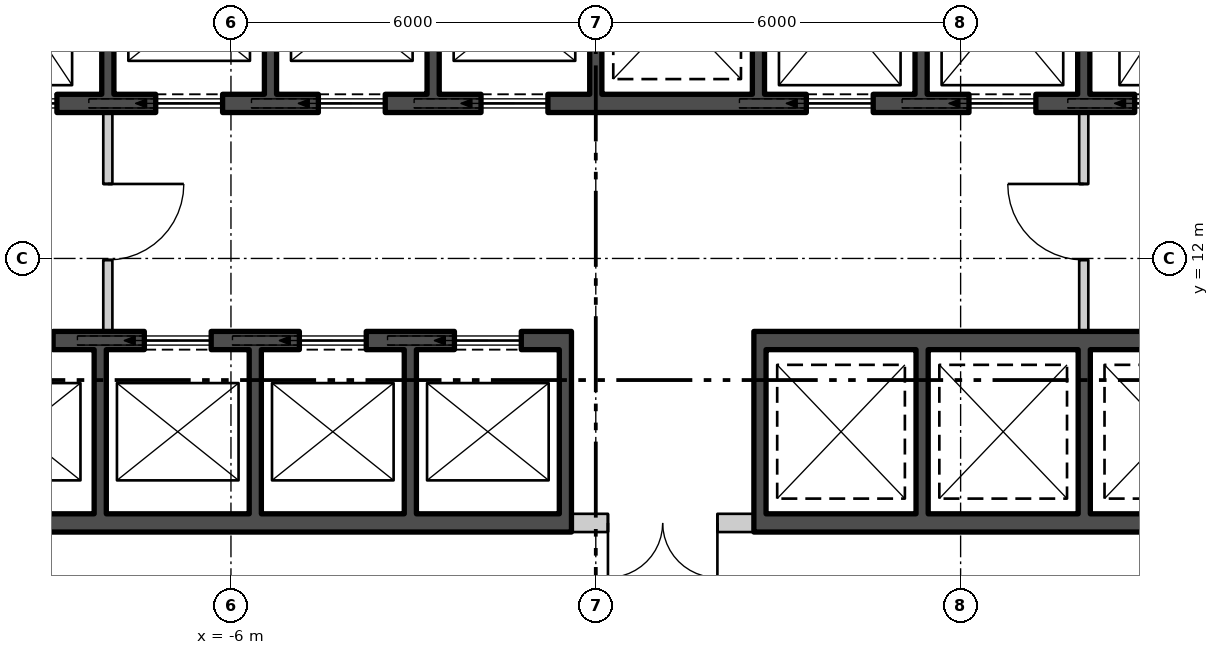
"""IFC4 building model, lengths in metres.
Left out: names, types, materials, properties, quantities, classifications, styles, units other than length and angle.
Written with IfcOpenShell. Run it as: python <this file> out.ifc"""

import sys

from ifc_helpers import new_model, si_unit, direction, frame, frame_2d, origin, place, context, subcontext, project, spatial, rectangle, extrude, element, fill, save


model = new_model("IFC4")
c1 = context("Model", 3, precision=1e-05, world=origin(), true_north=direction((0.0, 1.0)))
c2 = subcontext(c1, "Body", "Model", "MODEL_VIEW")
j1 = project(units=[si_unit("LENGTHUNIT", "METRE"), si_unit("PLANEANGLEUNIT", "RADIAN")], contexts=[c1])
p1 = place(None, origin())
s1 = spatial("IfcSite", under=j1, at=p1, CompositionType="ELEMENT")
p2 = place(p1, origin())
s2 = spatial("IfcBuilding", under=s1, at=p2, CompositionType="ELEMENT")
p3 = place(p2, frame((0.0, 0.0, 18.6)))
s3 = spatial("IfcBuildingStorey", under=s2, at=p3, CompositionType="ELEMENT", Elevation=18.6)
p4 = place(p3, frame((-10.7, 14.55, 0.0), z_axis=(0.0, 0.0, 1.0), x_axis=(1.0, 0.0, 0.0)))
e1 = element("IfcWall", 1, at=p4, inside=s3, PredefinedType="SHEAR", context=c2, shape_type="SweptSolid", body=[
    extrude(rectangle(XDim=21.4, YDim=0.3, at=frame_2d((10.7, 0.0))), origin(), (0.0, 0.0, 1.0), 4.88),
])
p5 = place(p4, frame((0.738, 0.0, 0.0)))
e2 = element("IfcOpeningElement", 2, at=p5, cuts=e1, PredefinedType="OPENING", context=c2, shape_type="SweptSolid", body=[
    extrude(rectangle(XDim=1.1, YDim=2.1, at=frame_2d((0.55, 1.05))), frame((0.0, 0.16, 0.0), z_axis=(0.0, -1.0, 0.0), x_axis=(1.0, 0.0, 0.0)), (0.0, 0.0, 1.0), 0.32),
])
p6 = place(p4, frame((3.462, 0.0, 0.0)))
e3 = element("IfcOpeningElement", 3, at=p6, cuts=e1, PredefinedType="OPENING", context=c2, shape_type="SweptSolid", body=[
    extrude(rectangle(XDim=1.1, YDim=2.1, at=frame_2d((0.55, 1.05))), frame((0.0, 0.16, 0.0), z_axis=(0.0, -1.0, 0.0), x_axis=(1.0, 0.0, 0.0)), (0.0, 0.0, 1.0), 0.32),
])
p7 = place(p4, frame((6.138, 0.0, 0.0)))
e4 = element("IfcOpeningElement", 4, at=p7, cuts=e1, PredefinedType="OPENING", context=c2, shape_type="SweptSolid", body=[
    extrude(rectangle(XDim=1.1, YDim=2.1, at=frame_2d((0.55, 1.05))), frame((0.0, 0.16, 0.0), z_axis=(0.0, -1.0, 0.0), x_axis=(1.0, 0.0, 0.0)), (0.0, 0.0, 1.0), 0.32),
])
p8 = place(p4, frame((8.812, 0.0, 0.0)))
e5 = element("IfcOpeningElement", 5, at=p8, cuts=e1, PredefinedType="OPENING", context=c2, shape_type="SweptSolid", body=[
    extrude(rectangle(XDim=1.1, YDim=2.1, at=frame_2d((0.55, 1.05))), frame((0.0, 0.16, 0.0), z_axis=(0.0, -1.0, 0.0), x_axis=(1.0, 0.0, 0.0)), (0.0, 0.0, 1.0), 0.32),
])
p9 = place(p4, frame((14.162, 0.0, 0.0)))
e6 = element("IfcOpeningElement", 6, at=p9, cuts=e1, PredefinedType="OPENING", context=c2, shape_type="SweptSolid", body=[
    extrude(rectangle(XDim=1.1, YDim=2.1, at=frame_2d((0.55, 1.05))), frame((0.0, 0.16, 0.0), z_axis=(0.0, -1.0, 0.0), x_axis=(1.0, 0.0, 0.0)), (0.0, 0.0, 1.0), 0.32),
])
p10 = place(p4, frame((16.837, 0.0, 0.0)))
e7 = element("IfcOpeningElement", 7, at=p10, cuts=e1, PredefinedType="OPENING", context=c2, shape_type="SweptSolid", body=[
    extrude(rectangle(XDim=1.1, YDim=2.1, at=frame_2d((0.55, 1.05))), frame((0.0, 0.16, 0.0), z_axis=(0.0, -1.0, 0.0), x_axis=(1.0, 0.0, 0.0)), (0.0, 0.0, 1.0), 0.32),
])
p11 = place(p4, frame((19.562, 0.0, 0.0)))
e8 = element("IfcOpeningElement", 8, at=p11, cuts=e1, PredefinedType="OPENING", context=c2, shape_type="SweptSolid", body=[
    extrude(rectangle(XDim=1.1, YDim=2.1, at=frame_2d((0.55, 1.05))), frame((0.0, 0.16, 0.0), z_axis=(0.0, -1.0, 0.0), x_axis=(1.0, 0.0, 0.0)), (0.0, 0.0, 1.0), 0.32),
])
p12 = place(p3, frame((-10.7, 10.65, 0.0), z_axis=(0.0, 0.0, 1.0), x_axis=(1.0, 0.0, 0.0)))
e9 = element("IfcWall", 9, at=p12, inside=s3, PredefinedType="SHEAR", context=c2, shape_type="SweptSolid", body=[
    extrude(rectangle(XDim=10.3, YDim=0.3, at=frame_2d((5.15, 0.0))), origin(), (0.0, 0.0, 1.0), 4.88),
])
p13 = place(p12, frame((0.675, 0.0, 0.0)))
e10 = element("IfcOpeningElement", 10, at=p13, cuts=e9, PredefinedType="OPENING", context=c2, shape_type="SweptSolid", body=[
    extrude(rectangle(XDim=1.1, YDim=2.1, at=frame_2d((0.55, 1.05))), frame((0.0, 0.16, 0.0), z_axis=(0.0, -1.0, 0.0), x_axis=(1.0, 0.0, 0.0)), (0.0, 0.0, 1.0), 0.32),
])
p14 = place(p12, frame((3.275, 0.0, 0.0)))
e11 = element("IfcOpeningElement", 11, at=p14, cuts=e9, PredefinedType="OPENING", context=c2, shape_type="SweptSolid", body=[
    extrude(rectangle(XDim=1.1, YDim=2.1, at=frame_2d((0.55, 1.05))), frame((0.0, 0.16, 0.0), z_axis=(0.0, -1.0, 0.0), x_axis=(1.0, 0.0, 0.0)), (0.0, 0.0, 1.0), 0.32),
])
p15 = place(p12, frame((5.825, 0.0, 0.0)))
e12 = element("IfcOpeningElement", 12, at=p15, cuts=e9, PredefinedType="OPENING", context=c2, shape_type="SweptSolid", body=[
    extrude(rectangle(XDim=1.1, YDim=2.1, at=frame_2d((0.55, 1.05))), frame((0.0, 0.16, 0.0), z_axis=(0.0, -1.0, 0.0), x_axis=(1.0, 0.0, 0.0)), (0.0, 0.0, 1.0), 0.32),
])
p16 = place(p12, frame((8.375, 0.0, 0.0)))
e13 = element("IfcOpeningElement", 13, at=p16, cuts=e9, PredefinedType="OPENING", context=c2, shape_type="SweptSolid", body=[
    extrude(rectangle(XDim=1.1, YDim=2.1, at=frame_2d((0.55, 1.05))), frame((0.0, 0.16, 0.0), z_axis=(0.0, -1.0, 0.0), x_axis=(1.0, 0.0, 0.0)), (0.0, 0.0, 1.0), 0.32),
])
p17 = place(p3, frame((-10.7, 7.65, 0.0), z_axis=(0.0, 0.0, 1.0), x_axis=(1.0, 0.0, 0.0)))
e14 = element("IfcWall", 14, at=p17, inside=s3, PredefinedType="SHEAR", context=c2, shape_type="SweptSolid", body=[
    extrude(rectangle(XDim=10.3, YDim=0.3, at=frame_2d((5.15, 0.0))), origin(), (0.0, 0.0, 1.0), 4.88),
])
for number, where, z_axis, x_axis in (
    (15, (2.6, 10.65, 0.0), (0.0, 0.0, 1.0), (1.0, 0.0, 0.0)),
    (16, (2.6, 7.65, 0.0), (0.0, 0.0, 1.0), (1.0, 0.0, 0.0)),
):
    element("IfcWall", number, at=place(p3, frame(where, z_axis=z_axis, x_axis=x_axis)), inside=s3, PredefinedType="SHEAR", context=c2, shape_type="SweptSolid", body=[
        extrude(rectangle(XDim=8.1, YDim=0.3, at=frame_2d((4.05, 0.0))), origin(), (0.0, 0.0, 1.0), 4.88),
    ])
for number, where, z_axis, x_axis in (
    (17, (-8.025, 14.7, 0.0), (0.0, 0.0, 1.0), (0.0, 1.0, 0.0)),
    (18, (-5.35, 14.7, 0.0), (0.0, 0.0, 1.0), (0.0, 1.0, 0.0)),
    (19, (-2.675, 14.7, 0.0), (0.0, 0.0, 1.0), (0.0, 1.0, 0.0)),
    (20, (0.0, 14.7, 0.0), (0.0, 0.0, 1.0), (0.0, 1.0, 0.0)),
    (21, (2.675, 14.7, 0.0), (0.0, 0.0, 1.0), (0.0, 1.0, 0.0)),
    (22, (5.35, 14.7, 0.0), (0.0, 0.0, 1.0), (0.0, 1.0, 0.0)),
    (23, (8.025, 14.7, 0.0), (0.0, 0.0, 1.0), (0.0, 1.0, 0.0)),
    (24, (-8.15, 7.8, 0.0), (0.0, 0.0, 1.0), (0.0, 1.0, 0.0)),
    (25, (-5.6, 7.8, 0.0), (0.0, 0.0, 1.0), (0.0, 1.0, 0.0)),
    (26, (-3.05, 7.8, 0.0), (0.0, 0.0, 1.0), (0.0, 1.0, 0.0)),
    (27, (-0.5, 7.8, 0.0), (0.0, 0.0, 1.0), (0.0, 1.0, 0.0)),
    (28, (2.7, 7.8, 0.0), (0.0, 0.0, 1.0), (0.0, 1.0, 0.0)),
    (29, (5.367, 7.8, 0.0), (0.0, 0.0, 1.0), (0.0, 1.0, 0.0)),
    (30, (8.033, 7.8, 0.0), (0.0, 0.0, 1.0), (0.0, 1.0, 0.0)),
):
    element("IfcWall", number, at=place(p3, frame(where, z_axis=z_axis, x_axis=x_axis)), inside=s3, PredefinedType="SHEAR", context=c2, shape_type="SweptSolid", body=[
        extrude(rectangle(XDim=2.7, YDim=0.2, at=frame_2d((1.35, 0.0))), origin(), (0.0, 0.0, 1.0), 4.88),
    ])
p18 = place(p3, frame((-8.025, 10.8, 0.0), z_axis=(0.0, 0.0, 1.0), x_axis=(0.0, 1.0, 0.0)))
e31 = element("IfcWall", 31, at=p18, inside=s3, PredefinedType="PARTITIONING", context=c2, shape_type="SweptSolid", body=[
    extrude(rectangle(XDim=3.6, YDim=0.15, at=frame_2d((1.8, 0.0))), origin(), (0.0, 0.0, 1.0), 4.88),
])
p19 = place(p18, frame((1.175, 0.0, 0.0)))
e32 = element("IfcOpeningElement", 32, at=p19, cuts=e31, PredefinedType="OPENING", context=c2, shape_type="SweptSolid", body=[
    extrude(rectangle(XDim=1.25, YDim=2.1, at=frame_2d((0.625, 1.05))), frame((0.0, 0.085, 0.0), z_axis=(0.0, -1.0, 0.0), x_axis=(1.0, 0.0, 0.0)), (0.0, 0.0, 1.0), 0.17),
])
p20 = place(p3, frame((8.025, 10.8, 0.0), z_axis=(0.0, 0.0, 1.0), x_axis=(0.0, 1.0, 0.0)))
e33 = element("IfcWall", 33, at=p20, inside=s3, PredefinedType="PARTITIONING", context=c2, shape_type="SweptSolid", body=[
    extrude(rectangle(XDim=3.6, YDim=0.15, at=frame_2d((1.8, 0.0))), origin(), (0.0, 0.0, 1.0), 4.88),
])
p21 = place(p20, frame((1.175, 0.0, 0.0)))
e34 = element("IfcOpeningElement", 34, at=p21, cuts=e33, PredefinedType="OPENING", context=c2, shape_type="SweptSolid", body=[
    extrude(rectangle(XDim=1.25, YDim=2.1, at=frame_2d((0.625, 1.05))), frame((0.0, 0.085, 0.0), z_axis=(0.0, -1.0, 0.0), x_axis=(1.0, 0.0, 0.0)), (0.0, 0.0, 1.0), 0.17),
])
p22 = place(p3, frame((-0.4, 7.65, 0.0), z_axis=(0.0, 0.0, 1.0), x_axis=(1.0, 0.0, 0.0)))
e35 = element("IfcWall", 35, at=p22, inside=s3, PredefinedType="PARTITIONING", context=c2, shape_type="SweptSolid", body=[
    extrude(rectangle(XDim=3.0, YDim=0.3, at=frame_2d((1.5, 0.0))), origin(), (0.0, 0.0, 1.0), 4.88),
])
p23 = place(p22, frame((0.6, 0.0, 0.0)))
e36 = element("IfcOpeningElement", 36, at=p23, cuts=e35, PredefinedType="OPENING", context=c2, shape_type="SweptSolid", body=[
    extrude(rectangle(XDim=1.8, YDim=2.4, at=frame_2d((0.9, 1.2))), frame((0.0, 0.16, 0.0), z_axis=(0.0, -1.0, 0.0), x_axis=(1.0, 0.0, 0.0)), (0.0, 0.0, 1.0), 0.32),
])
p24 = place(p5, origin())
e37 = element("IfcDoor", 37, at=p24, inside=s3, OperationType="SLIDING_TO_LEFT", PredefinedType="DOOR", context=c2, shape_type="SweptSolid", body=[
    extrude(rectangle(XDim=1.1, YDim=2.1, at=frame_2d((0.55, 1.05))), frame((0.0, 0.025, 0.0), z_axis=(0.0, -1.0, 0.0), x_axis=(1.0, 0.0, 0.0)), (0.0, 0.0, 1.0), 0.05),
])
fill(e2, e37)
p25 = place(p6, origin())
e38 = element("IfcDoor", 38, at=p25, inside=s3, OperationType="SLIDING_TO_LEFT", PredefinedType="DOOR", context=c2, shape_type="SweptSolid", body=[
    extrude(rectangle(XDim=1.1, YDim=2.1, at=frame_2d((0.55, 1.05))), frame((0.0, 0.025, 0.0), z_axis=(0.0, -1.0, 0.0), x_axis=(1.0, 0.0, 0.0)), (0.0, 0.0, 1.0), 0.05),
])
fill(e3, e38)
p26 = place(p7, origin())
e39 = element("IfcDoor", 39, at=p26, inside=s3, OperationType="SLIDING_TO_LEFT", PredefinedType="DOOR", context=c2, shape_type="SweptSolid", body=[
    extrude(rectangle(XDim=1.1, YDim=2.1, at=frame_2d((0.55, 1.05))), frame((0.0, 0.025, 0.0), z_axis=(0.0, -1.0, 0.0), x_axis=(1.0, 0.0, 0.0)), (0.0, 0.0, 1.0), 0.05),
])
fill(e4, e39)
p27 = place(p8, origin())
e40 = element("IfcDoor", 40, at=p27, inside=s3, OperationType="SLIDING_TO_LEFT", PredefinedType="DOOR", context=c2, shape_type="SweptSolid", body=[
    extrude(rectangle(XDim=1.1, YDim=2.1, at=frame_2d((0.55, 1.05))), frame((0.0, 0.025, 0.0), z_axis=(0.0, -1.0, 0.0), x_axis=(1.0, 0.0, 0.0)), (0.0, 0.0, 1.0), 0.05),
])
fill(e5, e40)
p28 = place(p9, origin())
e41 = element("IfcDoor", 41, at=p28, inside=s3, OperationType="SLIDING_TO_LEFT", PredefinedType="DOOR", context=c2, shape_type="SweptSolid", body=[
    extrude(rectangle(XDim=1.1, YDim=2.1, at=frame_2d((0.55, 1.05))), frame((0.0, 0.025, 0.0), z_axis=(0.0, -1.0, 0.0), x_axis=(1.0, 0.0, 0.0)), (0.0, 0.0, 1.0), 0.05),
])
fill(e6, e41)
p29 = place(p10, origin())
e42 = element("IfcDoor", 42, at=p29, inside=s3, OperationType="SLIDING_TO_LEFT", PredefinedType="DOOR", context=c2, shape_type="SweptSolid", body=[
    extrude(rectangle(XDim=1.1, YDim=2.1, at=frame_2d((0.55, 1.05))), frame((0.0, 0.025, 0.0), z_axis=(0.0, -1.0, 0.0), x_axis=(1.0, 0.0, 0.0)), (0.0, 0.0, 1.0), 0.05),
])
fill(e7, e42)
p30 = place(p11, origin())
e43 = element("IfcDoor", 43, at=p30, inside=s3, OperationType="SLIDING_TO_LEFT", PredefinedType="DOOR", context=c2, shape_type="SweptSolid", body=[
    extrude(rectangle(XDim=1.1, YDim=2.1, at=frame_2d((0.55, 1.05))), frame((0.0, 0.025, 0.0), z_axis=(0.0, -1.0, 0.0), x_axis=(1.0, 0.0, 0.0)), (0.0, 0.0, 1.0), 0.05),
])
fill(e8, e43)
p31 = place(p13, origin())
e44 = element("IfcDoor", 44, at=p31, inside=s3, OperationType="SLIDING_TO_LEFT", PredefinedType="DOOR", context=c2, shape_type="SweptSolid", body=[
    extrude(rectangle(XDim=1.1, YDim=2.1, at=frame_2d((0.55, 1.05))), frame((0.0, 0.025, 0.0), z_axis=(0.0, -1.0, 0.0), x_axis=(1.0, 0.0, 0.0)), (0.0, 0.0, 1.0), 0.05),
])
fill(e10, e44)
p32 = place(p14, origin())
e45 = element("IfcDoor", 45, at=p32, inside=s3, OperationType="SLIDING_TO_LEFT", PredefinedType="DOOR", context=c2, shape_type="SweptSolid", body=[
    extrude(rectangle(XDim=1.1, YDim=2.1, at=frame_2d((0.55, 1.05))), frame((0.0, 0.025, 0.0), z_axis=(0.0, -1.0, 0.0), x_axis=(1.0, 0.0, 0.0)), (0.0, 0.0, 1.0), 0.05),
])
fill(e11, e45)
p33 = place(p15, origin())
e46 = element("IfcDoor", 46, at=p33, inside=s3, OperationType="SLIDING_TO_LEFT", PredefinedType="DOOR", context=c2, shape_type="SweptSolid", body=[
    extrude(rectangle(XDim=1.1, YDim=2.1, at=frame_2d((0.55, 1.05))), frame((0.0, 0.025, 0.0), z_axis=(0.0, -1.0, 0.0), x_axis=(1.0, 0.0, 0.0)), (0.0, 0.0, 1.0), 0.05),
])
fill(e12, e46)
p34 = place(p16, origin())
e47 = element("IfcDoor", 47, at=p34, inside=s3, OperationType="SLIDING_TO_LEFT", PredefinedType="DOOR", context=c2, shape_type="SweptSolid", body=[
    extrude(rectangle(XDim=1.1, YDim=2.1, at=frame_2d((0.55, 1.05))), frame((0.0, 0.025, 0.0), z_axis=(0.0, -1.0, 0.0), x_axis=(1.0, 0.0, 0.0)), (0.0, 0.0, 1.0), 0.05),
])
fill(e13, e47)
p35 = place(p19, origin())
e48 = element("IfcDoor", 48, at=p35, inside=s3, OperationType="SINGLE_SWING_RIGHT", PredefinedType="DOOR", context=c2, shape_type="SweptSolid", body=[
    extrude(rectangle(XDim=1.25, YDim=2.1, at=frame_2d((0.625, 1.05))), frame((0.0, 0.025, 0.0), z_axis=(0.0, -1.0, 0.0), x_axis=(1.0, 0.0, 0.0)), (0.0, 0.0, 1.0), 0.05),
])
fill(e32, e48)
p36 = place(p21, origin())
e49 = element("IfcDoor", 49, at=p36, inside=s3, OperationType="SINGLE_SWING_LEFT", PredefinedType="DOOR", context=c2, shape_type="SweptSolid", body=[
    extrude(rectangle(XDim=1.25, YDim=2.1, at=frame_2d((0.625, 1.05))), frame((0.0, 0.025, 0.0), z_axis=(0.0, -1.0, 0.0), x_axis=(1.0, 0.0, 0.0)), (0.0, 0.0, 1.0), 0.05),
])
fill(e34, e49)
p37 = place(p23, origin())
e50 = element("IfcDoor", 50, at=p37, inside=s3, OperationType="DOUBLE_DOOR_SINGLE_SWING", PredefinedType="DOOR", context=c2, shape_type="SweptSolid", body=[
    extrude(rectangle(XDim=1.8, YDim=2.4, at=frame_2d((0.9, 1.2))), frame((0.0, 0.025, 0.0), z_axis=(0.0, -1.0, 0.0), x_axis=(1.0, 0.0, 0.0)), (0.0, 0.0, 1.0), 0.05),
])
fill(e36, e50)
save(model, sys.argv[1])
